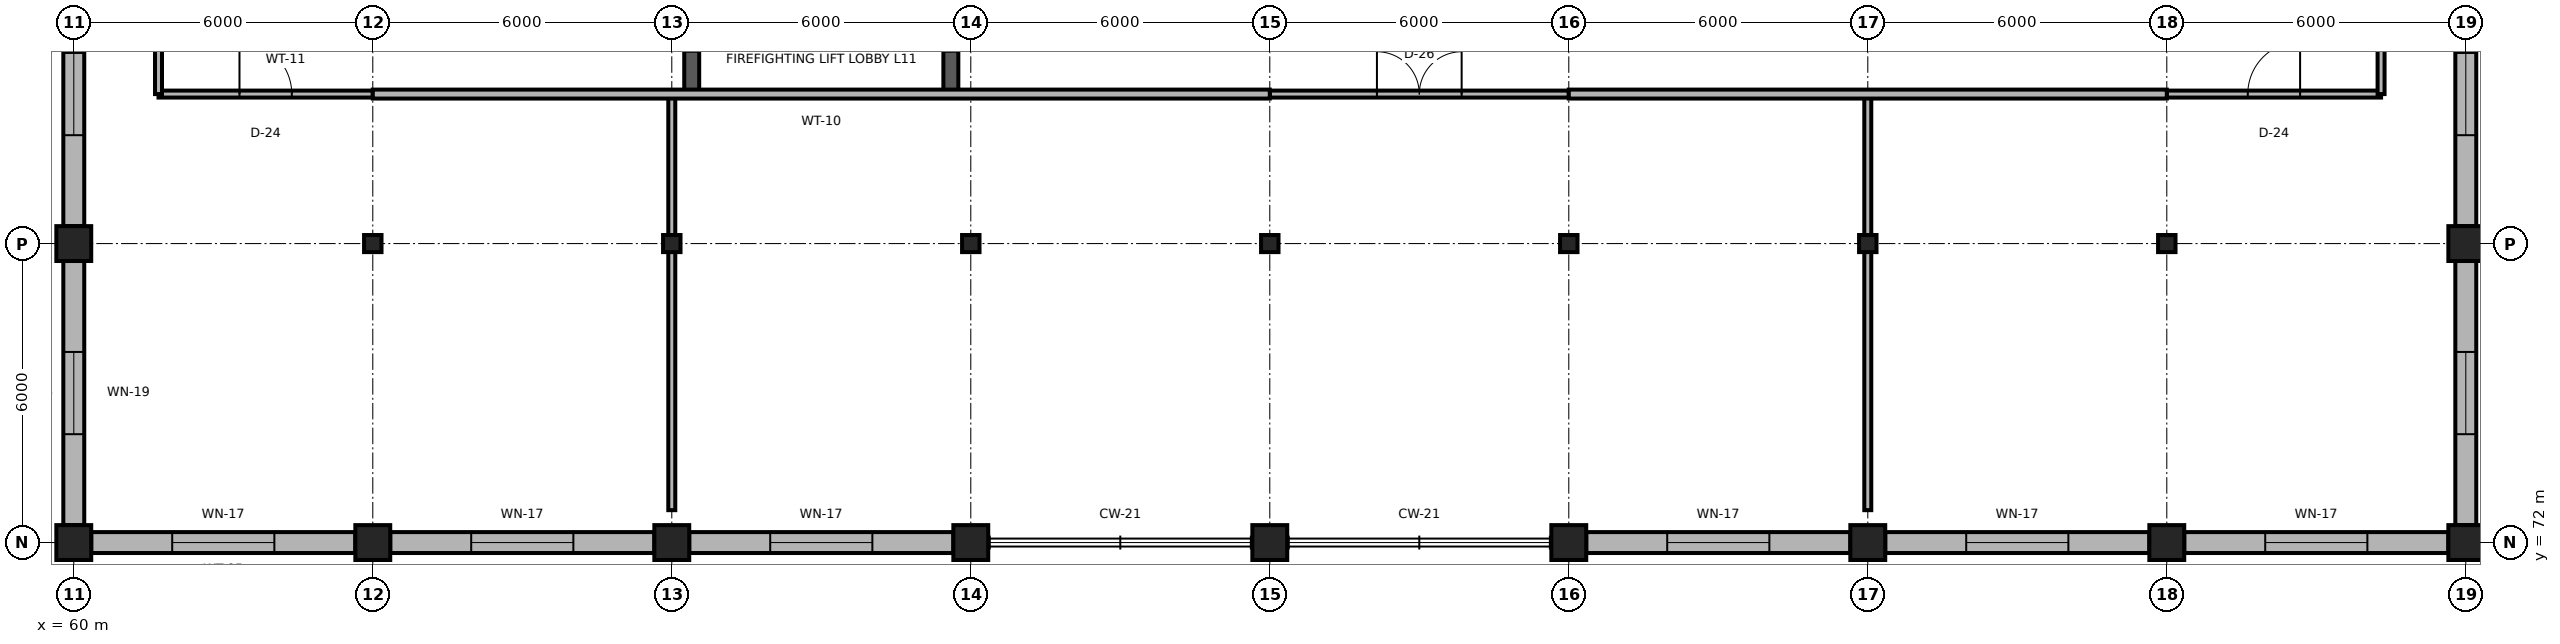
"""IFC4 building model, lengths in metres.
Left out: names, types, materials, properties, quantities, classifications, styles, units other than length and angle.
Written with IfcOpenShell. Run it as: python <this file> out.ifc"""

import sys

from ifc_helpers import new_model, si_unit, direction, frame, frame_2d, origin, origin_2d, place, context, subcontext, project, spatial, rectangle, i_section, extrude, element, fill, save


model = new_model("IFC4")
c1 = context("Model", 3, precision=1e-05, world=origin(), true_north=direction((0.0, 1.0)))
c2 = subcontext(c1, "Body", "Model", "MODEL_VIEW")
j1 = project(units=[si_unit("LENGTHUNIT", "METRE"), si_unit("PLANEANGLEUNIT", "RADIAN")], contexts=[c1])
p1 = place(None, origin())
s1 = spatial("IfcSite", under=j1, at=p1, CompositionType="ELEMENT")
p2 = place(p1, origin())
s2 = spatial("IfcBuilding", under=s1, at=p2, CompositionType="ELEMENT")
p3 = place(p2, frame((0.0, 0.0, 44.4)))
s3 = spatial("IfcBuildingStorey", under=s2, at=p3, CompositionType="ELEMENT", Elevation=44.4)
for number, where, z_axis, x_axis in (
    (1, (60.0, 72.0, 0.0), (0.0, 0.0, 1.0), (1.0, 0.0, 0.0)),
    (2, (66.0, 72.0, 0.0), (0.0, 0.0, 1.0), (1.0, 0.0, 0.0)),
    (3, (72.0, 72.0, 0.0), (0.0, 0.0, 1.0), (1.0, 0.0, 0.0)),
    (4, (78.0, 72.0, 0.0), (0.0, 0.0, 1.0), (1.0, 0.0, 0.0)),
    (5, (84.0, 72.0, 0.0), (0.0, 0.0, 1.0), (1.0, 0.0, 0.0)),
    (6, (90.0, 72.0, 0.0), (0.0, 0.0, 1.0), (1.0, 0.0, 0.0)),
    (7, (96.0, 72.0, 0.0), (0.0, 0.0, 1.0), (1.0, 0.0, 0.0)),
    (8, (102.0, 72.0, 0.0), (0.0, 0.0, 1.0), (1.0, 0.0, 0.0)),
    (9, (108.0, 72.0, 0.0), (0.0, 0.0, 1.0), (1.0, 0.0, 0.0)),
    (10, (60.0, 78.0, 0.0), (0.0, 0.0, 1.0), (1.0, 0.0, 0.0)),
):
    element("IfcColumn", number, at=place(p3, frame(where, z_axis=z_axis, x_axis=x_axis)), inside=s3, PredefinedType="COLUMN", context=c2, shape_type="SweptSolid", body=[
        extrude(rectangle(XDim=0.7, YDim=0.7, at=origin_2d()), origin(), (0.0, 0.0, 1.0), 3.9),
    ])
for number, where, z_axis, x_axis in (
    (11, (66.0, 78.0, 0.0), (0.0, 0.0, 1.0), (1.0, 0.0, 0.0)),
    (12, (72.0, 78.0, 0.0), (0.0, 0.0, 1.0), (1.0, 0.0, 0.0)),
    (13, (78.0, 78.0, 0.0), (0.0, 0.0, 1.0), (1.0, 0.0, 0.0)),
    (14, (84.0, 78.0, 0.0), (0.0, 0.0, 1.0), (1.0, 0.0, 0.0)),
    (15, (90.0, 78.0, 0.0), (0.0, 0.0, 1.0), (1.0, 0.0, 0.0)),
    (16, (96.0, 78.0, 0.0), (0.0, 0.0, 1.0), (1.0, 0.0, 0.0)),
    (17, (102.0, 78.0, 0.0), (0.0, 0.0, 1.0), (1.0, 0.0, 0.0)),
):
    element("IfcColumn", number, at=place(p3, frame(where, z_axis=z_axis, x_axis=x_axis)), inside=s3, PredefinedType="COLUMN", context=c2, shape_type="SweptSolid", body=[
        extrude(i_section(OverallWidth=0.35, OverallDepth=0.343, WebThickness=0.01, FlangeThickness=0.015, FilletRadius=0.02, at=origin_2d()), origin(), (0.0, 0.0, 1.0), 3.9),
    ])
p4 = place(p3, frame((108.0, 78.0, 0.0), z_axis=(0.0, 0.0, 1.0), x_axis=(1.0, 0.0, 0.0)))
e18 = element("IfcColumn", 18, at=p4, inside=s3, PredefinedType="COLUMN", context=c2, shape_type="SweptSolid", body=[
    extrude(rectangle(XDim=0.7, YDim=0.7, at=origin_2d()), origin(), (0.0, 0.0, 1.0), 3.9),
])
p5 = place(p3, frame((60.35, 72.0, 0.0), z_axis=(0.0, 0.0, 1.0), x_axis=(1.0, 0.0, 0.0)))
e19 = element("IfcWall", 19, at=p5, inside=s3, PredefinedType="SOLIDWALL", context=c2, shape_type="SweptSolid", body=[
    extrude(rectangle(XDim=5.3, YDim=0.42, at=frame_2d((2.65, 0.0))), origin(), (0.0, 0.0, 1.0), 3.32),
])
p6 = place(p5, frame((1.625, 0.0, 0.85)))
e20 = element("IfcOpeningElement", 20, at=p6, cuts=e19, PredefinedType="OPENING", context=c2, shape_type="SweptSolid", body=[
    extrude(rectangle(XDim=2.05, YDim=2.0, at=frame_2d((1.025, 1.0))), frame((0.0, 0.225, 0.0), z_axis=(0.0, -1.0, 0.0), x_axis=(1.0, 0.0, 0.0)), (0.0, 0.0, 1.0), 0.45),
])
p7 = place(p3, frame((66.35, 72.0, 0.0), z_axis=(0.0, 0.0, 1.0), x_axis=(1.0, 0.0, 0.0)))
e21 = element("IfcWall", 21, at=p7, inside=s3, PredefinedType="SOLIDWALL", context=c2, shape_type="SweptSolid", body=[
    extrude(rectangle(XDim=5.3, YDim=0.42, at=frame_2d((2.65, 0.0))), origin(), (0.0, 0.0, 1.0), 3.32),
])
p8 = place(p7, frame((1.625, 0.0, 0.85)))
e22 = element("IfcOpeningElement", 22, at=p8, cuts=e21, PredefinedType="OPENING", context=c2, shape_type="SweptSolid", body=[
    extrude(rectangle(XDim=2.05, YDim=2.0, at=frame_2d((1.025, 1.0))), frame((0.0, 0.225, 0.0), z_axis=(0.0, -1.0, 0.0), x_axis=(1.0, 0.0, 0.0)), (0.0, 0.0, 1.0), 0.45),
])
p9 = place(p3, frame((72.35, 72.0, 0.0), z_axis=(0.0, 0.0, 1.0), x_axis=(1.0, 0.0, 0.0)))
e23 = element("IfcWall", 23, at=p9, inside=s3, PredefinedType="SOLIDWALL", context=c2, shape_type="SweptSolid", body=[
    extrude(rectangle(XDim=5.3, YDim=0.42, at=frame_2d((2.65, 0.0))), origin(), (0.0, 0.0, 1.0), 3.32),
])
p10 = place(p9, frame((1.625, 0.0, 0.85)))
e24 = element("IfcOpeningElement", 24, at=p10, cuts=e23, PredefinedType="OPENING", context=c2, shape_type="SweptSolid", body=[
    extrude(rectangle(XDim=2.05, YDim=2.0, at=frame_2d((1.025, 1.0))), frame((0.0, 0.225, 0.0), z_axis=(0.0, -1.0, 0.0), x_axis=(1.0, 0.0, 0.0)), (0.0, 0.0, 1.0), 0.45),
])
p11 = place(p3, frame((90.35, 72.0, 0.0), z_axis=(0.0, 0.0, 1.0), x_axis=(1.0, 0.0, 0.0)))
e25 = element("IfcWall", 25, at=p11, inside=s3, PredefinedType="SOLIDWALL", context=c2, shape_type="SweptSolid", body=[
    extrude(rectangle(XDim=5.3, YDim=0.42, at=frame_2d((2.65, 0.0))), origin(), (0.0, 0.0, 1.0), 3.32),
])
p12 = place(p11, frame((1.625, 0.0, 0.85)))
e26 = element("IfcOpeningElement", 26, at=p12, cuts=e25, PredefinedType="OPENING", context=c2, shape_type="SweptSolid", body=[
    extrude(rectangle(XDim=2.05, YDim=2.0, at=frame_2d((1.025, 1.0))), frame((0.0, 0.225, 0.0), z_axis=(0.0, -1.0, 0.0), x_axis=(1.0, 0.0, 0.0)), (0.0, 0.0, 1.0), 0.45),
])
p13 = place(p3, frame((96.35, 72.0, 0.0), z_axis=(0.0, 0.0, 1.0), x_axis=(1.0, 0.0, 0.0)))
e27 = element("IfcWall", 27, at=p13, inside=s3, PredefinedType="SOLIDWALL", context=c2, shape_type="SweptSolid", body=[
    extrude(rectangle(XDim=5.3, YDim=0.42, at=frame_2d((2.65, 0.0))), origin(), (0.0, 0.0, 1.0), 3.32),
])
p14 = place(p13, frame((1.625, 0.0, 0.85)))
e28 = element("IfcOpeningElement", 28, at=p14, cuts=e27, PredefinedType="OPENING", context=c2, shape_type="SweptSolid", body=[
    extrude(rectangle(XDim=2.05, YDim=2.0, at=frame_2d((1.025, 1.0))), frame((0.0, 0.225, 0.0), z_axis=(0.0, -1.0, 0.0), x_axis=(1.0, 0.0, 0.0)), (0.0, 0.0, 1.0), 0.45),
])
p15 = place(p3, frame((102.35, 72.0, 0.0), z_axis=(0.0, 0.0, 1.0), x_axis=(1.0, 0.0, 0.0)))
e29 = element("IfcWall", 29, at=p15, inside=s3, PredefinedType="SOLIDWALL", context=c2, shape_type="SweptSolid", body=[
    extrude(rectangle(XDim=5.3, YDim=0.42, at=frame_2d((2.65, 0.0))), origin(), (0.0, 0.0, 1.0), 3.32),
])
p16 = place(p15, frame((1.625, 0.0, 0.85)))
e30 = element("IfcOpeningElement", 30, at=p16, cuts=e29, PredefinedType="OPENING", context=c2, shape_type="SweptSolid", body=[
    extrude(rectangle(XDim=2.05, YDim=2.0, at=frame_2d((1.025, 1.0))), frame((0.0, 0.225, 0.0), z_axis=(0.0, -1.0, 0.0), x_axis=(1.0, 0.0, 0.0)), (0.0, 0.0, 1.0), 0.45),
])
p17 = place(p3, frame((60.0, 72.35, 0.0), z_axis=(0.0, 0.0, 1.0), x_axis=(0.0, 1.0, 0.0)))
e31 = element("IfcWall", 31, at=p17, inside=s3, PredefinedType="SOLIDWALL", context=c2, shape_type="SweptSolid", body=[
    extrude(rectangle(XDim=5.3, YDim=0.42, at=frame_2d((2.65, 0.0))), origin(), (0.0, 0.0, 1.0), 3.32),
])
p18 = place(p17, frame((1.825, 0.0, 0.85)))
e32 = element("IfcOpeningElement", 32, at=p18, cuts=e31, PredefinedType="OPENING", context=c2, shape_type="SweptSolid", body=[
    extrude(rectangle(XDim=1.65, YDim=1.95, at=frame_2d((0.825, 0.975))), frame((0.0, 0.225, 0.0), z_axis=(0.0, -1.0, 0.0), x_axis=(1.0, 0.0, 0.0)), (0.0, 0.0, 1.0), 0.45),
])
p19 = place(p3, frame((60.0, 78.35, 0.0), z_axis=(0.0, 0.0, 1.0), x_axis=(0.0, 1.0, 0.0)))
e33 = element("IfcWall", 33, at=p19, inside=s3, PredefinedType="SOLIDWALL", context=c2, shape_type="SweptSolid", body=[
    extrude(rectangle(XDim=5.3, YDim=0.42, at=frame_2d((2.65, 0.0))), origin(), (0.0, 0.0, 1.0), 3.32),
])
p20 = place(p19, frame((1.825, 0.0, 0.85)))
e34 = element("IfcOpeningElement", 34, at=p20, cuts=e33, PredefinedType="OPENING", context=c2, shape_type="SweptSolid", body=[
    extrude(rectangle(XDim=1.65, YDim=1.95, at=frame_2d((0.825, 0.975))), frame((0.0, 0.225, 0.0), z_axis=(0.0, -1.0, 0.0), x_axis=(1.0, 0.0, 0.0)), (0.0, 0.0, 1.0), 0.45),
])
p21 = place(p3, frame((108.0, 72.35, 0.0), z_axis=(0.0, 0.0, 1.0), x_axis=(0.0, 1.0, 0.0)))
e35 = element("IfcWall", 35, at=p21, inside=s3, PredefinedType="SOLIDWALL", context=c2, shape_type="SweptSolid", body=[
    extrude(rectangle(XDim=5.3, YDim=0.42, at=frame_2d((2.65, 0.0))), origin(), (0.0, 0.0, 1.0), 3.32),
])
p22 = place(p21, frame((1.825, 0.0, 0.85)))
e36 = element("IfcOpeningElement", 36, at=p22, cuts=e35, PredefinedType="OPENING", context=c2, shape_type="SweptSolid", body=[
    extrude(rectangle(XDim=1.65, YDim=1.95, at=frame_2d((0.825, 0.975))), frame((0.0, 0.225, 0.0), z_axis=(0.0, -1.0, 0.0), x_axis=(1.0, 0.0, 0.0)), (0.0, 0.0, 1.0), 0.45),
])
p23 = place(p3, frame((108.0, 78.35, 0.0), z_axis=(0.0, 0.0, 1.0), x_axis=(0.0, 1.0, 0.0)))
e37 = element("IfcWall", 37, at=p23, inside=s3, PredefinedType="SOLIDWALL", context=c2, shape_type="SweptSolid", body=[
    extrude(rectangle(XDim=5.3, YDim=0.42, at=frame_2d((2.65, 0.0))), origin(), (0.0, 0.0, 1.0), 3.32),
])
p24 = place(p23, frame((1.825, 0.0, 0.85)))
e38 = element("IfcOpeningElement", 38, at=p24, cuts=e37, PredefinedType="OPENING", context=c2, shape_type="SweptSolid", body=[
    extrude(rectangle(XDim=1.65, YDim=1.95, at=frame_2d((0.825, 0.975))), frame((0.0, 0.225, 0.0), z_axis=(0.0, -1.0, 0.0), x_axis=(1.0, 0.0, 0.0)), (0.0, 0.0, 1.0), 0.45),
])
p25 = place(p3, frame((72.4, 81.0, 0.0), z_axis=(0.0, 0.0, 1.0), x_axis=(0.0, 1.0, 0.0)))
e39 = element("IfcWall", 39, at=p25, inside=s3, PredefinedType="SHEAR", context=c2, shape_type="SweptSolid", body=[
    extrude(rectangle(XDim=3.0, YDim=0.3, at=frame_2d((1.5, 0.0))), origin(), (0.0, 0.0, 1.0), 3.74),
])
p26 = place(p25, frame((0.85, 0.0, 0.0)))
e40 = element("IfcOpeningElement", 40, at=p26, cuts=e39, PredefinedType="OPENING", context=c2, shape_type="SweptSolid", body=[
    extrude(rectangle(XDim=1.3, YDim=2.2, at=frame_2d((0.65, 1.1))), frame((0.0, 0.165, 0.0), z_axis=(0.0, -1.0, 0.0), x_axis=(1.0, 0.0, 0.0)), (0.0, 0.0, 1.0), 0.33),
])
p27 = place(p3, frame((77.6, 81.0, 0.0), z_axis=(0.0, 0.0, 1.0), x_axis=(0.0, 1.0, 0.0)))
e41 = element("IfcWall", 41, at=p27, inside=s3, PredefinedType="SHEAR", context=c2, shape_type="SweptSolid", body=[
    extrude(rectangle(XDim=3.0, YDim=0.3, at=frame_2d((1.5, 0.0))), origin(), (0.0, 0.0, 1.0), 3.74),
])
p28 = place(p27, frame((0.85, 0.0, 0.0)))
e42 = element("IfcOpeningElement", 42, at=p28, cuts=e41, PredefinedType="OPENING", context=c2, shape_type="SweptSolid", body=[
    extrude(rectangle(XDim=1.3, YDim=2.2, at=frame_2d((0.65, 1.1))), frame((0.0, 0.165, 0.0), z_axis=(0.0, -1.0, 0.0), x_axis=(1.0, 0.0, 0.0)), (0.0, 0.0, 1.0), 0.33),
])
p29 = place(p3, frame((61.7, 81.0, 0.0), z_axis=(0.0, 0.0, 1.0), x_axis=(1.0, 0.0, 0.0)))
e43 = element("IfcWall", 43, at=p29, inside=s3, PredefinedType="PARTITIONING", context=c2, shape_type="SweptSolid", body=[
    extrude(rectangle(XDim=4.3, YDim=0.14, at=frame_2d((2.15, 0.0))), origin(), (0.0, 0.0, 1.0), 3.74),
])
p30 = place(p29, frame((1.625, 0.0, 0.0)))
e44 = element("IfcOpeningElement", 44, at=p30, cuts=e43, PredefinedType="OPENING", context=c2, shape_type="SweptSolid", body=[
    extrude(rectangle(XDim=1.05, YDim=2.25, at=frame_2d((0.525, 1.125))), frame((0.0, 0.085, 0.0), z_axis=(0.0, -1.0, 0.0), x_axis=(1.0, 0.0, 0.0)), (0.0, 0.0, 1.0), 0.17),
])
p31 = place(p3, frame((84.0, 81.0, 0.0), z_axis=(0.0, 0.0, 1.0), x_axis=(1.0, 0.0, 0.0)))
e45 = element("IfcWall", 45, at=p31, inside=s3, PredefinedType="PARTITIONING", context=c2, shape_type="SweptSolid", body=[
    extrude(rectangle(XDim=6.0, YDim=0.14, at=frame_2d((3.0, 0.0))), origin(), (0.0, 0.0, 1.0), 3.74),
])
p32 = place(p31, frame((2.15, 0.0, 0.0)))
e46 = element("IfcOpeningElement", 46, at=p32, cuts=e45, PredefinedType="OPENING", context=c2, shape_type="SweptSolid", body=[
    extrude(rectangle(XDim=1.7, YDim=2.45, at=frame_2d((0.85, 1.225))), frame((0.0, 0.085, 0.0), z_axis=(0.0, -1.0, 0.0), x_axis=(1.0, 0.0, 0.0)), (0.0, 0.0, 1.0), 0.17),
])
p33 = place(p3, frame((102.0, 81.0, 0.0), z_axis=(0.0, 0.0, 1.0), x_axis=(1.0, 0.0, 0.0)))
e47 = element("IfcWall", 47, at=p33, inside=s3, PredefinedType="PARTITIONING", context=c2, shape_type="SweptSolid", body=[
    extrude(rectangle(XDim=4.3, YDim=0.14, at=frame_2d((2.15, 0.0))), origin(), (0.0, 0.0, 1.0), 3.74),
])
p34 = place(p33, frame((1.625, 0.0, 0.0)))
e48 = element("IfcOpeningElement", 48, at=p34, cuts=e47, PredefinedType="OPENING", context=c2, shape_type="SweptSolid", body=[
    extrude(rectangle(XDim=1.05, YDim=2.25, at=frame_2d((0.525, 1.125))), frame((0.0, 0.085, 0.0), z_axis=(0.0, -1.0, 0.0), x_axis=(1.0, 0.0, 0.0)), (0.0, 0.0, 1.0), 0.17),
])
for number, where, z_axis, x_axis in (
    (49, (72.0, 72.65, 0.0), (0.0, 0.0, 1.0), (0.0, 1.0, 0.0)),
    (50, (96.0, 72.65, 0.0), (0.0, 0.0, 1.0), (0.0, 1.0, 0.0)),
):
    element("IfcWall", number, at=place(p3, frame(where, z_axis=z_axis, x_axis=x_axis)), inside=s3, PredefinedType="PARTITIONING", context=c2, shape_type="SweptSolid", body=[
        extrude(rectangle(XDim=8.35, YDim=0.14, at=frame_2d((4.175, 0.0))), origin(), (0.0, 0.0, 1.0), 3.348),
    ])
p35 = place(p3, frame((66.0, 81.0, 0.0), z_axis=(0.0, 0.0, 1.0), x_axis=(1.0, 0.0, 0.0)))
e51 = element("IfcWall", 51, at=p35, inside=s3, PredefinedType="PARTITIONING", context=c2, shape_type="SweptSolid", body=[
    extrude(rectangle(XDim=18.0, YDim=0.18, at=frame_2d((9.0, 0.0))), origin(), (0.0, 0.0, 1.0), 3.74),
])
p36 = place(p3, frame((90.0, 81.0, 0.0), z_axis=(0.0, 0.0, 1.0), x_axis=(1.0, 0.0, 0.0)))
e52 = element("IfcWall", 52, at=p36, inside=s3, PredefinedType="PARTITIONING", context=c2, shape_type="SweptSolid", body=[
    extrude(rectangle(XDim=12.0, YDim=0.18, at=frame_2d((6.0, 0.0))), origin(), (0.0, 0.0, 1.0), 3.74),
])
for number, where, z_axis, x_axis in (
    (53, (61.7, 81.0, 0.0), (0.0, 0.0, 1.0), (0.0, 1.0, 0.0)),
    (54, (106.3, 81.0, 0.0), (0.0, 0.0, 1.0), (0.0, 1.0, 0.0)),
):
    element("IfcWall", number, at=place(p3, frame(where, z_axis=z_axis, x_axis=x_axis)), inside=s3, PredefinedType="PARTITIONING", context=c2, shape_type="SweptSolid", body=[
        extrude(rectangle(XDim=1.15, YDim=0.14, at=frame_2d((0.575, 0.0))), origin(), (0.0, 0.0, 1.0), 3.74),
    ])
p37 = place(p6, origin())
e55 = element("IfcWindow", 55, at=p37, inside=s3, PartitioningType="SINGLE_PANEL", PredefinedType="WINDOW", context=c2, shape_type="SweptSolid", body=[
    extrude(rectangle(XDim=2.05, YDim=2.0, at=frame_2d((1.025, 1.0))), frame((0.0, 0.03, 0.0), z_axis=(0.0, -1.0, 0.0), x_axis=(1.0, 0.0, 0.0)), (0.0, 0.0, 1.0), 0.06),
])
fill(e20, e55)
p38 = place(p8, origin())
e56 = element("IfcWindow", 56, at=p38, inside=s3, PartitioningType="SINGLE_PANEL", PredefinedType="WINDOW", context=c2, shape_type="SweptSolid", body=[
    extrude(rectangle(XDim=2.05, YDim=2.0, at=frame_2d((1.025, 1.0))), frame((0.0, 0.03, 0.0), z_axis=(0.0, -1.0, 0.0), x_axis=(1.0, 0.0, 0.0)), (0.0, 0.0, 1.0), 0.06),
])
fill(e22, e56)
p39 = place(p10, origin())
e57 = element("IfcWindow", 57, at=p39, inside=s3, PartitioningType="SINGLE_PANEL", PredefinedType="WINDOW", context=c2, shape_type="SweptSolid", body=[
    extrude(rectangle(XDim=2.05, YDim=2.0, at=frame_2d((1.025, 1.0))), frame((0.0, 0.03, 0.0), z_axis=(0.0, -1.0, 0.0), x_axis=(1.0, 0.0, 0.0)), (0.0, 0.0, 1.0), 0.06),
])
fill(e24, e57)
p40 = place(p12, origin())
e58 = element("IfcWindow", 58, at=p40, inside=s3, PartitioningType="SINGLE_PANEL", PredefinedType="WINDOW", context=c2, shape_type="SweptSolid", body=[
    extrude(rectangle(XDim=2.05, YDim=2.0, at=frame_2d((1.025, 1.0))), frame((0.0, 0.03, 0.0), z_axis=(0.0, -1.0, 0.0), x_axis=(1.0, 0.0, 0.0)), (0.0, 0.0, 1.0), 0.06),
])
fill(e26, e58)
p41 = place(p14, origin())
e59 = element("IfcWindow", 59, at=p41, inside=s3, PartitioningType="SINGLE_PANEL", PredefinedType="WINDOW", context=c2, shape_type="SweptSolid", body=[
    extrude(rectangle(XDim=2.05, YDim=2.0, at=frame_2d((1.025, 1.0))), frame((0.0, 0.03, 0.0), z_axis=(0.0, -1.0, 0.0), x_axis=(1.0, 0.0, 0.0)), (0.0, 0.0, 1.0), 0.06),
])
fill(e28, e59)
p42 = place(p16, origin())
e60 = element("IfcWindow", 60, at=p42, inside=s3, PartitioningType="SINGLE_PANEL", PredefinedType="WINDOW", context=c2, shape_type="SweptSolid", body=[
    extrude(rectangle(XDim=2.05, YDim=2.0, at=frame_2d((1.025, 1.0))), frame((0.0, 0.03, 0.0), z_axis=(0.0, -1.0, 0.0), x_axis=(1.0, 0.0, 0.0)), (0.0, 0.0, 1.0), 0.06),
])
fill(e30, e60)
p43 = place(p18, origin())
e61 = element("IfcWindow", 61, at=p43, inside=s3, PartitioningType="SINGLE_PANEL", PredefinedType="WINDOW", context=c2, shape_type="SweptSolid", body=[
    extrude(rectangle(XDim=1.65, YDim=1.95, at=frame_2d((0.825, 0.975))), frame((0.0, 0.03, 0.0), z_axis=(0.0, -1.0, 0.0), x_axis=(1.0, 0.0, 0.0)), (0.0, 0.0, 1.0), 0.06),
])
fill(e32, e61)
p44 = place(p20, origin())
e62 = element("IfcWindow", 62, at=p44, inside=s3, PartitioningType="SINGLE_PANEL", PredefinedType="WINDOW", context=c2, shape_type="SweptSolid", body=[
    extrude(rectangle(XDim=1.65, YDim=1.95, at=frame_2d((0.825, 0.975))), frame((0.0, 0.03, 0.0), z_axis=(0.0, -1.0, 0.0), x_axis=(1.0, 0.0, 0.0)), (0.0, 0.0, 1.0), 0.06),
])
fill(e34, e62)
p45 = place(p22, origin())
e63 = element("IfcWindow", 63, at=p45, inside=s3, PartitioningType="SINGLE_PANEL", PredefinedType="WINDOW", context=c2, shape_type="SweptSolid", body=[
    extrude(rectangle(XDim=1.65, YDim=1.95, at=frame_2d((0.825, 0.975))), frame((0.0, 0.03, 0.0), z_axis=(0.0, -1.0, 0.0), x_axis=(1.0, 0.0, 0.0)), (0.0, 0.0, 1.0), 0.06),
])
fill(e36, e63)
p46 = place(p24, origin())
e64 = element("IfcWindow", 64, at=p46, inside=s3, PartitioningType="SINGLE_PANEL", PredefinedType="WINDOW", context=c2, shape_type="SweptSolid", body=[
    extrude(rectangle(XDim=1.65, YDim=1.95, at=frame_2d((0.825, 0.975))), frame((0.0, 0.03, 0.0), z_axis=(0.0, -1.0, 0.0), x_axis=(1.0, 0.0, 0.0)), (0.0, 0.0, 1.0), 0.06),
])
fill(e38, e64)
p47 = place(p30, origin())
e65 = element("IfcDoor", 65, at=p47, inside=s3, OperationType="SINGLE_SWING_LEFT", PredefinedType="DOOR", context=c2, shape_type="SweptSolid", body=[
    extrude(rectangle(XDim=1.05, YDim=2.25, at=frame_2d((0.525, 1.125))), frame((0.0, 0.025, 0.0), z_axis=(0.0, -1.0, 0.0), x_axis=(1.0, 0.0, 0.0)), (0.0, 0.0, 1.0), 0.05),
])
fill(e44, e65)
p48 = place(p32, origin())
e66 = element("IfcDoor", 66, at=p48, inside=s3, OperationType="DOUBLE_DOOR_SINGLE_SWING", PredefinedType="DOOR", context=c2, shape_type="SweptSolid", body=[
    extrude(rectangle(XDim=1.7, YDim=2.45, at=frame_2d((0.85, 1.225))), frame((0.0, 0.025, 0.0), z_axis=(0.0, -1.0, 0.0), x_axis=(1.0, 0.0, 0.0)), (0.0, 0.0, 1.0), 0.05),
])
fill(e46, e66)
p49 = place(p34, origin())
e67 = element("IfcDoor", 67, at=p49, inside=s3, OperationType="SINGLE_SWING_RIGHT", PredefinedType="DOOR", context=c2, shape_type="SweptSolid", body=[
    extrude(rectangle(XDim=1.05, YDim=2.25, at=frame_2d((0.525, 1.125))), frame((0.0, 0.025, 0.0), z_axis=(0.0, -1.0, 0.0), x_axis=(1.0, 0.0, 0.0)), (0.0, 0.0, 1.0), 0.05),
])
fill(e48, e67)
save(model, sys.argv[1])
